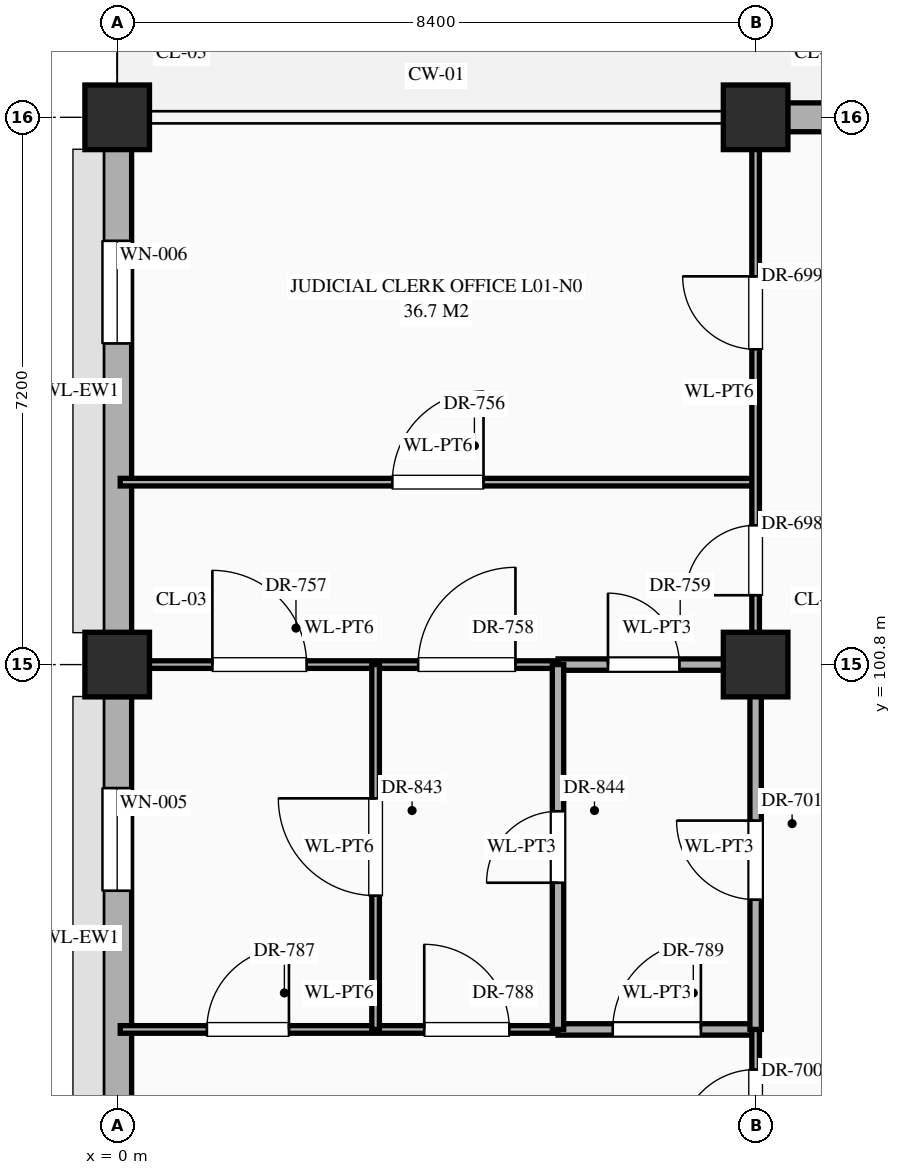
"""IFC4 building model, lengths in metres.
Left out: names, types, materials, properties, quantities, classifications, styles, units other than length and angle.
Written with IfcOpenShell. Run it as: python <this file> out.ifc"""

import sys

from ifc_helpers import new_model, si_unit, direction, frame, frame_2d, origin, origin_2d, place, context, subcontext, project, spatial, rectangle, extrude, element, fill, save


model = new_model("IFC4")
c1 = context("Model", 3, precision=1e-05, world=origin(), true_north=direction((0.0, 1.0)))
c2 = subcontext(c1, "Body", "Model", "MODEL_VIEW")
j1 = project(units=[si_unit("LENGTHUNIT", "METRE"), si_unit("PLANEANGLEUNIT", "RADIAN")], contexts=[c1])
p1 = place(None, origin())
s1 = spatial("IfcSite", under=j1, at=p1, CompositionType="ELEMENT")
p2 = place(p1, origin())
s2 = spatial("IfcBuilding", under=s1, at=p2, CompositionType="ELEMENT")
p3 = place(p2, origin())
s3 = spatial("IfcBuildingStorey", under=s2, at=p3, CompositionType="ELEMENT", Elevation=0.0)
for number, where, z_axis, x_axis in (
    (1, (0.0, 100.8, 0.0), (0.0, 0.0, 1.0), (1.0, 0.0, 0.0)),
    (2, (0.0, 108.0, 0.0), (0.0, 0.0, 1.0), (1.0, 0.0, 0.0)),
    (3, (8.4, 100.8, 0.0), (0.0, 0.0, 1.0), (1.0, 0.0, 0.0)),
    (4, (8.4, 108.0, 0.0), (0.0, 0.0, 1.0), (1.0, 0.0, 0.0)),
):
    element("IfcColumn", number, at=place(p3, frame(where, z_axis=z_axis, x_axis=x_axis)), inside=s3, PredefinedType="COLUMN", context=c2, shape_type="SweptSolid", body=[
        extrude(rectangle(XDim=0.85, YDim=0.85, at=origin_2d()), origin(), (0.0, 0.0, 1.0), 5.4),
    ])
p4 = place(p3, frame((0.0, 94.02, 0.0), z_axis=(0.0, 0.0, 1.0), x_axis=(0.0, 1.0, 0.0)))
e5 = element("IfcWall", 5, at=p4, inside=s3, PredefinedType="STANDARD", context=c2, shape_type="SweptSolid", body=[
    extrude(rectangle(XDim=6.36, YDim=0.38, at=frame_2d((3.18, 0.0))), origin(), (0.0, 0.0, 1.0), 4.47),
])
p5 = place(p4, frame((3.805, 0.0, 0.85)))
e6 = element("IfcOpeningElement", 6, at=p5, cuts=e5, PredefinedType="OPENING", context=c2, shape_type="SweptSolid", body=[
    extrude(rectangle(XDim=1.35, YDim=1.92, at=frame_2d((0.675, 0.96))), frame((0.0, 0.202, 0.0), z_axis=(0.0, -1.0, 0.0), x_axis=(1.0, 0.0, 0.0)), (0.0, 0.0, 1.0), 0.404),
])
p6 = place(p3, frame((0.0, 101.22, 0.0), z_axis=(0.0, 0.0, 1.0), x_axis=(0.0, 1.0, 0.0)))
e7 = element("IfcWall", 7, at=p6, inside=s3, PredefinedType="STANDARD", context=c2, shape_type="SweptSolid", body=[
    extrude(rectangle(XDim=6.36, YDim=0.38, at=frame_2d((3.18, 0.0))), origin(), (0.0, 0.0, 1.0), 4.47),
])
p7 = place(p6, frame((3.805, 0.0, 0.85)))
e8 = element("IfcOpeningElement", 8, at=p7, cuts=e7, PredefinedType="OPENING", context=c2, shape_type="SweptSolid", body=[
    extrude(rectangle(XDim=1.35, YDim=2.12, at=frame_2d((0.675, 1.06))), frame((0.0, 0.202, 0.0), z_axis=(0.0, -1.0, 0.0), x_axis=(1.0, 0.0, 0.0)), (0.0, 0.0, 1.0), 0.404),
])
p8 = place(p3, frame((8.82, 108.0, 0.0), z_axis=(0.0, 0.0, 1.0), x_axis=(1.0, 0.0, 0.0)))
e9 = element("IfcWall", 9, at=p8, inside=s3, PredefinedType="STANDARD", context=c2, shape_type="SweptSolid", body=[
    extrude(rectangle(XDim=7.56, YDim=0.38, at=frame_2d((3.78, 0.0))), origin(), (0.0, 0.0, 1.0), 4.47),
])
p9 = place(p8, frame((1.68, 0.0, 0.0)))
e10 = element("IfcOpeningElement", 10, at=p9, cuts=e9, PredefinedType="OPENING", context=c2, shape_type="SweptSolid", body=[
    extrude(rectangle(XDim=4.2, YDim=3.6, at=frame_2d((2.1, 1.8))), frame((0.0, 0.202, 0.0), z_axis=(0.0, -1.0, 0.0), x_axis=(1.0, 0.0, 0.0)), (0.0, 0.0, 1.0), 0.404),
])
p10 = place(p3, frame((0.04, 96.0, 0.0), z_axis=(0.0, 0.0, 1.0), x_axis=(1.0, 0.0, 0.0)))
e11 = element("IfcWall", 11, at=p10, inside=s3, PredefinedType="STANDARD", context=c2, shape_type="SweptSolid", body=[
    extrude(rectangle(XDim=5.76, YDim=0.1, at=frame_2d((2.88, 0.0))), origin(), (0.0, 0.0, 1.0), 5.12),
])
p11 = place(p10, frame((1.14, 0.0, 0.0)))
e12 = element("IfcOpeningElement", 12, at=p11, cuts=e11, PredefinedType="OPENING", context=c2, shape_type="SweptSolid", body=[
    extrude(rectangle(XDim=1.08, YDim=2.25, at=frame_2d((0.54, 1.125))), frame((0.0, 0.062, 0.0), z_axis=(0.0, -1.0, 0.0), x_axis=(1.0, 0.0, 0.0)), (0.0, 0.0, 1.0), 0.124),
])
p12 = place(p10, frame((4.0, 0.0, 0.0)))
e13 = element("IfcOpeningElement", 13, at=p12, cuts=e11, PredefinedType="OPENING", context=c2, shape_type="SweptSolid", body=[
    extrude(rectangle(XDim=1.12, YDim=2.25, at=frame_2d((0.56, 1.125))), frame((0.0, 0.062, 0.0), z_axis=(0.0, -1.0, 0.0), x_axis=(1.0, 0.0, 0.0)), (0.0, 0.0, 1.0), 0.124),
])
p13 = place(p3, frame((5.8, 96.0, 0.0), z_axis=(0.0, 0.0, 1.0), x_axis=(1.0, 0.0, 0.0)))
e14 = element("IfcWall", 14, at=p13, inside=s3, PredefinedType="STANDARD", context=c2, shape_type="SweptSolid", body=[
    extrude(rectangle(XDim=2.6, YDim=0.15, at=frame_2d((1.3, 0.0))), origin(), (0.0, 0.0, 1.0), 5.12),
])
p14 = place(p13, frame((0.72, 0.0, 0.0)))
e15 = element("IfcOpeningElement", 15, at=p14, cuts=e14, PredefinedType="OPENING", context=c2, shape_type="SweptSolid", body=[
    extrude(rectangle(XDim=1.16, YDim=2.3, at=frame_2d((0.58, 1.15))), frame((0.0, 0.087, 0.0), z_axis=(0.0, -1.0, 0.0), x_axis=(1.0, 0.0, 0.0)), (0.0, 0.0, 1.0), 0.174),
])
p15 = place(p3, frame((0.04, 100.8, 0.0), z_axis=(0.0, 0.0, 1.0), x_axis=(1.0, 0.0, 0.0)))
e16 = element("IfcWall", 16, at=p15, inside=s3, PredefinedType="STANDARD", context=c2, shape_type="SweptSolid", body=[
    extrude(rectangle(XDim=5.76, YDim=0.1, at=frame_2d((2.88, 0.0))), origin(), (0.0, 0.0, 1.0), 4.27),
])
p16 = place(p15, frame((1.212, 0.0, 0.0)))
e17 = element("IfcOpeningElement", 17, at=p16, cuts=e16, PredefinedType="OPENING", context=c2, shape_type="SweptSolid", body=[
    extrude(rectangle(XDim=1.24, YDim=2.3, at=frame_2d((0.62, 1.15))), frame((0.0, 0.062, 0.0), z_axis=(0.0, -1.0, 0.0), x_axis=(1.0, 0.0, 0.0)), (0.0, 0.0, 1.0), 0.124),
])
p17 = place(p15, frame((3.92, 0.0, 0.0)))
e18 = element("IfcOpeningElement", 18, at=p17, cuts=e16, PredefinedType="OPENING", context=c2, shape_type="SweptSolid", body=[
    extrude(rectangle(XDim=1.28, YDim=2.35, at=frame_2d((0.64, 1.175))), frame((0.0, 0.062, 0.0), z_axis=(0.0, -1.0, 0.0), x_axis=(1.0, 0.0, 0.0)), (0.0, 0.0, 1.0), 0.124),
])
p18 = place(p3, frame((5.8, 100.8, 0.0), z_axis=(0.0, 0.0, 1.0), x_axis=(1.0, 0.0, 0.0)))
e19 = element("IfcWall", 19, at=p18, inside=s3, PredefinedType="STANDARD", context=c2, shape_type="SweptSolid", body=[
    extrude(rectangle(XDim=2.6, YDim=0.15, at=frame_2d((1.3, 0.0))), origin(), (0.0, 0.0, 1.0), 4.27),
])
p19 = place(p18, frame((0.657, 0.0, 0.0)))
e20 = element("IfcOpeningElement", 20, at=p19, cuts=e19, PredefinedType="OPENING", context=c2, shape_type="SweptSolid", body=[
    extrude(rectangle(XDim=0.94, YDim=2.3, at=frame_2d((0.47, 1.15))), frame((0.0, 0.087, 0.0), z_axis=(0.0, -1.0, 0.0), x_axis=(1.0, 0.0, 0.0)), (0.0, 0.0, 1.0), 0.174),
])
p20 = place(p3, frame((0.04, 103.2, 0.0), z_axis=(0.0, 0.0, 1.0), x_axis=(1.0, 0.0, 0.0)))
e21 = element("IfcWall", 21, at=p20, inside=s3, PredefinedType="STANDARD", context=c2, shape_type="SweptSolid", body=[
    extrude(rectangle(XDim=8.36, YDim=0.1, at=frame_2d((4.18, 0.0))), origin(), (0.0, 0.0, 1.0), 5.12),
])
p21 = place(p20, frame((3.58, 0.0, 0.0)))
e22 = element("IfcOpeningElement", 22, at=p21, cuts=e21, PredefinedType="OPENING", context=c2, shape_type="SweptSolid", body=[
    extrude(rectangle(XDim=1.2, YDim=2.35, at=frame_2d((0.6, 1.175))), frame((0.0, 0.062, 0.0), z_axis=(0.0, -1.0, 0.0), x_axis=(1.0, 0.0, 0.0)), (0.0, 0.0, 1.0), 0.124),
])
p22 = place(p3, frame((3.4, 96.0, 0.0), z_axis=(0.0, 0.0, 1.0), x_axis=(0.0, 1.0, 0.0)))
e23 = element("IfcWall", 23, at=p22, inside=s3, PredefinedType="STANDARD", context=c2, shape_type="SweptSolid", body=[
    extrude(rectangle(XDim=4.8, YDim=0.1, at=frame_2d((2.4, 0.0))), origin(), (0.0, 0.0, 1.0), 5.12),
])
p23 = place(p22, frame((1.76, 0.0, 0.0)))
e24 = element("IfcOpeningElement", 24, at=p23, cuts=e23, PredefinedType="OPENING", context=c2, shape_type="SweptSolid", body=[
    extrude(rectangle(XDim=1.28, YDim=2.35, at=frame_2d((0.64, 1.175))), frame((0.0, 0.062, 0.0), z_axis=(0.0, -1.0, 0.0), x_axis=(1.0, 0.0, 0.0)), (0.0, 0.0, 1.0), 0.124),
])
p24 = place(p3, frame((5.8, 96.0, 0.0), z_axis=(0.0, 0.0, 1.0), x_axis=(0.0, 1.0, 0.0)))
e25 = element("IfcWall", 25, at=p24, inside=s3, PredefinedType="STANDARD", context=c2, shape_type="SweptSolid", body=[
    extrude(rectangle(XDim=4.8, YDim=0.15, at=frame_2d((2.4, 0.0))), origin(), (0.0, 0.0, 1.0), 5.12),
])
p25 = place(p24, frame((1.93, 0.0, 0.0)))
e26 = element("IfcOpeningElement", 26, at=p25, cuts=e25, PredefinedType="OPENING", context=c2, shape_type="SweptSolid", body=[
    extrude(rectangle(XDim=0.94, YDim=2.3, at=frame_2d((0.47, 1.15))), frame((0.0, 0.087, 0.0), z_axis=(0.0, -1.0, 0.0), x_axis=(1.0, 0.0, 0.0)), (0.0, 0.0, 1.0), 0.174),
])
p26 = place(p3, frame((8.4, 43.2, 0.0), z_axis=(0.0, 0.0, 1.0), x_axis=(0.0, 1.0, 0.0)))
e27 = element("IfcWall", 27, at=p26, inside=s3, PredefinedType="STANDARD", context=c2, shape_type="SweptSolid", body=[
    extrude(rectangle(XDim=52.8, YDim=0.1, at=frame_2d((26.4, 0.0))), origin(), (0.0, 0.0, 1.0), 4.37),
])
p27 = place(p26, frame((51.272, 0.0, 0.0)))
e28 = element("IfcOpeningElement", 28, at=p27, cuts=e27, PredefinedType="OPENING", context=c2, shape_type="SweptSolid", body=[
    extrude(rectangle(XDim=1.0, YDim=2.25, at=frame_2d((0.5, 1.125))), frame((0.0, 0.062, 0.0), z_axis=(0.0, -1.0, 0.0), x_axis=(1.0, 0.0, 0.0)), (0.0, 0.0, 1.0), 0.124),
])
p28 = place(p26, frame((46.26, 0.0, 0.0)))
e29 = element("IfcOpeningElement", 29, at=p28, cuts=e27, PredefinedType="OPENING", context=c2, shape_type="SweptSolid", body=[
    extrude(rectangle(XDim=1.08, YDim=2.25, at=frame_2d((0.54, 1.125))), frame((0.0, 0.062, 0.0), z_axis=(0.0, -1.0, 0.0), x_axis=(1.0, 0.0, 0.0)), (0.0, 0.0, 1.0), 0.124),
])
p29 = place(p26, frame((41.268, 0.0, 0.0)))
e30 = element("IfcOpeningElement", 30, at=p29, cuts=e27, PredefinedType="OPENING", context=c2, shape_type="SweptSolid", body=[
    extrude(rectangle(XDim=1.12, YDim=2.25, at=frame_2d((0.56, 1.125))), frame((0.0, 0.062, 0.0), z_axis=(0.0, -1.0, 0.0), x_axis=(1.0, 0.0, 0.0)), (0.0, 0.0, 1.0), 0.124),
])
p30 = place(p26, frame((37.992, 0.0, 0.0)))
e31 = element("IfcOpeningElement", 31, at=p30, cuts=e27, PredefinedType="OPENING", context=c2, shape_type="SweptSolid", body=[
    extrude(rectangle(XDim=1.16, YDim=2.3, at=frame_2d((0.58, 1.15))), frame((0.0, 0.062, 0.0), z_axis=(0.0, -1.0, 0.0), x_axis=(1.0, 0.0, 0.0)), (0.0, 0.0, 1.0), 0.124),
])
p31 = place(p26, frame((17.38, 0.0, 0.0)))
e32 = element("IfcOpeningElement", 32, at=p31, cuts=e27, PredefinedType="OPENING", context=c2, shape_type="SweptSolid", body=[
    extrude(rectangle(XDim=1.24, YDim=2.3, at=frame_2d((0.62, 1.15))), frame((0.0, 0.062, 0.0), z_axis=(0.0, -1.0, 0.0), x_axis=(1.0, 0.0, 0.0)), (0.0, 0.0, 1.0), 0.124),
])
p32 = place(p26, frame((24.56, 0.0, 0.0)))
e33 = element("IfcOpeningElement", 33, at=p32, cuts=e27, PredefinedType="OPENING", context=c2, shape_type="SweptSolid", body=[
    extrude(rectangle(XDim=1.28, YDim=2.35, at=frame_2d((0.64, 1.175))), frame((0.0, 0.062, 0.0), z_axis=(0.0, -1.0, 0.0), x_axis=(1.0, 0.0, 0.0)), (0.0, 0.0, 1.0), 0.124),
])
p33 = place(p26, frame((31.93, 0.0, 0.0)))
e34 = element("IfcOpeningElement", 34, at=p33, cuts=e27, PredefinedType="OPENING", context=c2, shape_type="SweptSolid", body=[
    extrude(rectangle(XDim=0.94, YDim=2.3, at=frame_2d((0.47, 1.15))), frame((0.0, 0.062, 0.0), z_axis=(0.0, -1.0, 0.0), x_axis=(1.0, 0.0, 0.0)), (0.0, 0.0, 1.0), 0.124),
])
p34 = place(p26, frame((0.772, 0.0, 0.0)))
e35 = element("IfcOpeningElement", 35, at=p34, cuts=e27, PredefinedType="OPENING", context=c2, shape_type="SweptSolid", body=[
    extrude(rectangle(XDim=1.2, YDim=2.35, at=frame_2d((0.6, 1.175))), frame((0.0, 0.062, 0.0), z_axis=(0.0, -1.0, 0.0), x_axis=(1.0, 0.0, 0.0)), (0.0, 0.0, 1.0), 0.124),
])
p35 = place(p26, frame((4.008, 0.0, 0.0)))
e36 = element("IfcOpeningElement", 36, at=p35, cuts=e27, PredefinedType="OPENING", context=c2, shape_type="SweptSolid", body=[
    extrude(rectangle(XDim=1.24, YDim=2.3, at=frame_2d((0.62, 1.15))), frame((0.0, 0.062, 0.0), z_axis=(0.0, -1.0, 0.0), x_axis=(1.0, 0.0, 0.0)), (0.0, 0.0, 1.0), 0.124),
])
p36 = place(p26, frame((10.16, 0.0, 0.0)))
e37 = element("IfcOpeningElement", 37, at=p36, cuts=e27, PredefinedType="OPENING", context=c2, shape_type="SweptSolid", body=[
    extrude(rectangle(XDim=1.28, YDim=2.35, at=frame_2d((0.64, 1.175))), frame((0.0, 0.062, 0.0), z_axis=(0.0, -1.0, 0.0), x_axis=(1.0, 0.0, 0.0)), (0.0, 0.0, 1.0), 0.124),
])
p37 = place(p3, frame((8.4, 96.0, 0.0), z_axis=(0.0, 0.0, 1.0), x_axis=(0.0, 1.0, 0.0)))
e38 = element("IfcWall", 38, at=p37, inside=s3, PredefinedType="STANDARD", context=c2, shape_type="SweptSolid", body=[
    extrude(rectangle(XDim=4.8, YDim=0.15, at=frame_2d((2.4, 0.0))), origin(), (0.0, 0.0, 1.0), 4.37),
])
p38 = place(p37, frame((1.708, 0.0, 0.0)))
e39 = element("IfcOpeningElement", 39, at=p38, cuts=e38, PredefinedType="OPENING", context=c2, shape_type="SweptSolid", body=[
    extrude(rectangle(XDim=1.04, YDim=2.2, at=frame_2d((0.52, 1.1))), frame((0.0, 0.087, 0.0), z_axis=(0.0, -1.0, 0.0), x_axis=(1.0, 0.0, 0.0)), (0.0, 0.0, 1.0), 0.174),
])
p39 = place(p3, frame((8.4, 100.8, 0.0), z_axis=(0.0, 0.0, 1.0), x_axis=(0.0, 1.0, 0.0)))
e40 = element("IfcWall", 40, at=p39, inside=s3, PredefinedType="STANDARD", context=c2, shape_type="SweptSolid", body=[
    extrude(rectangle(XDim=7.16, YDim=0.1, at=frame_2d((3.58, 0.0))), origin(), (0.0, 0.0, 1.0), 4.37),
])
p40 = place(p39, frame((0.913, 0.0, 0.0)))
e41 = element("IfcOpeningElement", 41, at=p40, cuts=e40, PredefinedType="OPENING", context=c2, shape_type="SweptSolid", body=[
    extrude(rectangle(XDim=0.92, YDim=2.15, at=frame_2d((0.46, 1.075))), frame((0.0, 0.062, 0.0), z_axis=(0.0, -1.0, 0.0), x_axis=(1.0, 0.0, 0.0)), (0.0, 0.0, 1.0), 0.124),
])
p41 = place(p39, frame((4.147, 0.0, 0.0)))
e42 = element("IfcOpeningElement", 42, at=p41, cuts=e40, PredefinedType="OPENING", context=c2, shape_type="SweptSolid", body=[
    extrude(rectangle(XDim=0.96, YDim=2.2, at=frame_2d((0.48, 1.1))), frame((0.0, 0.062, 0.0), z_axis=(0.0, -1.0, 0.0), x_axis=(1.0, 0.0, 0.0)), (0.0, 0.0, 1.0), 0.124),
])
p42 = place(p5, origin())
e43 = element("IfcWindow", 43, at=p42, inside=s3, PartitioningType="SINGLE_PANEL", PredefinedType="WINDOW", context=c2, shape_type="SweptSolid", body=[
    extrude(rectangle(XDim=1.35, YDim=1.92, at=frame_2d((0.675, 0.96))), frame((0.0, 0.03, 0.0), z_axis=(0.0, -1.0, 0.0), x_axis=(1.0, 0.0, 0.0)), (0.0, 0.0, 1.0), 0.06),
])
fill(e6, e43)
p43 = place(p7, origin())
e44 = element("IfcWindow", 44, at=p43, inside=s3, PartitioningType="SINGLE_PANEL", PredefinedType="WINDOW", context=c2, shape_type="SweptSolid", body=[
    extrude(rectangle(XDim=1.35, YDim=2.12, at=frame_2d((0.675, 1.06))), frame((0.0, 0.03, 0.0), z_axis=(0.0, -1.0, 0.0), x_axis=(1.0, 0.0, 0.0)), (0.0, 0.0, 1.0), 0.06),
])
fill(e8, e44)
p44 = place(p40, origin())
e45 = element("IfcDoor", 45, at=p44, inside=s3, OperationType="SINGLE_SWING_LEFT", PredefinedType="DOOR", context=c2, shape_type="SweptSolid", body=[
    extrude(rectangle(XDim=0.92, YDim=2.15, at=frame_2d((0.46, 1.075))), frame((0.0, 0.025, 0.0), z_axis=(0.0, -1.0, 0.0), x_axis=(1.0, 0.0, 0.0)), (0.0, 0.0, 1.0), 0.05),
])
fill(e41, e45)
p45 = place(p41, origin())
e46 = element("IfcDoor", 46, at=p45, inside=s3, OperationType="SINGLE_SWING_RIGHT", PredefinedType="DOOR", context=c2, shape_type="SweptSolid", body=[
    extrude(rectangle(XDim=0.96, YDim=2.2, at=frame_2d((0.48, 1.1))), frame((0.0, 0.025, 0.0), z_axis=(0.0, -1.0, 0.0), x_axis=(1.0, 0.0, 0.0)), (0.0, 0.0, 1.0), 0.05),
])
fill(e42, e46)
p46 = place(p27, origin())
e47 = element("IfcDoor", 47, at=p46, inside=s3, OperationType="SINGLE_SWING_LEFT", PredefinedType="DOOR", context=c2, shape_type="SweptSolid", body=[
    extrude(rectangle(XDim=1.0, YDim=2.25, at=frame_2d((0.5, 1.125))), frame((0.0, 0.025, 0.0), z_axis=(0.0, -1.0, 0.0), x_axis=(1.0, 0.0, 0.0)), (0.0, 0.0, 1.0), 0.05),
])
fill(e28, e47)
p47 = place(p38, origin())
e48 = element("IfcDoor", 48, at=p47, inside=s3, OperationType="SINGLE_SWING_RIGHT", PredefinedType="DOOR", context=c2, shape_type="SweptSolid", body=[
    extrude(rectangle(XDim=1.04, YDim=2.2, at=frame_2d((0.52, 1.1))), frame((0.0, 0.025, 0.0), z_axis=(0.0, -1.0, 0.0), x_axis=(1.0, 0.0, 0.0)), (0.0, 0.0, 1.0), 0.05),
])
fill(e39, e48)
p48 = place(p21, origin())
e49 = element("IfcDoor", 49, at=p48, inside=s3, OperationType="SINGLE_SWING_RIGHT", PredefinedType="DOOR", context=c2, shape_type="SweptSolid", body=[
    extrude(rectangle(XDim=1.2, YDim=2.35, at=frame_2d((0.6, 1.175))), frame((0.0, 0.025, 0.0), z_axis=(0.0, -1.0, 0.0), x_axis=(1.0, 0.0, 0.0)), (0.0, 0.0, 1.0), 0.05),
])
fill(e22, e49)
p49 = place(p16, origin())
e50 = element("IfcDoor", 50, at=p49, inside=s3, OperationType="SINGLE_SWING_LEFT", PredefinedType="DOOR", context=c2, shape_type="SweptSolid", body=[
    extrude(rectangle(XDim=1.24, YDim=2.3, at=frame_2d((0.62, 1.15))), frame((0.0, 0.025, 0.0), z_axis=(0.0, -1.0, 0.0), x_axis=(1.0, 0.0, 0.0)), (0.0, 0.0, 1.0), 0.05),
])
fill(e17, e50)
p50 = place(p17, origin())
e51 = element("IfcDoor", 51, at=p50, inside=s3, OperationType="SINGLE_SWING_RIGHT", PredefinedType="DOOR", context=c2, shape_type="SweptSolid", body=[
    extrude(rectangle(XDim=1.28, YDim=2.35, at=frame_2d((0.64, 1.175))), frame((0.0, 0.025, 0.0), z_axis=(0.0, -1.0, 0.0), x_axis=(1.0, 0.0, 0.0)), (0.0, 0.0, 1.0), 0.05),
])
fill(e18, e51)
p51 = place(p19, origin())
e52 = element("IfcDoor", 52, at=p51, inside=s3, OperationType="SINGLE_SWING_LEFT", PredefinedType="DOOR", context=c2, shape_type="SweptSolid", body=[
    extrude(rectangle(XDim=0.94, YDim=2.3, at=frame_2d((0.47, 1.15))), frame((0.0, 0.025, 0.0), z_axis=(0.0, -1.0, 0.0), x_axis=(1.0, 0.0, 0.0)), (0.0, 0.0, 1.0), 0.05),
])
fill(e20, e52)
p52 = place(p11, origin())
e53 = element("IfcDoor", 53, at=p52, inside=s3, OperationType="SINGLE_SWING_RIGHT", PredefinedType="DOOR", context=c2, shape_type="SweptSolid", body=[
    extrude(rectangle(XDim=1.08, YDim=2.25, at=frame_2d((0.54, 1.125))), frame((0.0, 0.025, 0.0), z_axis=(0.0, -1.0, 0.0), x_axis=(1.0, 0.0, 0.0)), (0.0, 0.0, 1.0), 0.05),
])
fill(e12, e53)
p53 = place(p12, origin())
e54 = element("IfcDoor", 54, at=p53, inside=s3, OperationType="SINGLE_SWING_LEFT", PredefinedType="DOOR", context=c2, shape_type="SweptSolid", body=[
    extrude(rectangle(XDim=1.12, YDim=2.25, at=frame_2d((0.56, 1.125))), frame((0.0, 0.025, 0.0), z_axis=(0.0, -1.0, 0.0), x_axis=(1.0, 0.0, 0.0)), (0.0, 0.0, 1.0), 0.05),
])
fill(e13, e54)
p54 = place(p14, origin())
e55 = element("IfcDoor", 55, at=p54, inside=s3, OperationType="SINGLE_SWING_RIGHT", PredefinedType="DOOR", context=c2, shape_type="SweptSolid", body=[
    extrude(rectangle(XDim=1.16, YDim=2.3, at=frame_2d((0.58, 1.15))), frame((0.0, 0.025, 0.0), z_axis=(0.0, -1.0, 0.0), x_axis=(1.0, 0.0, 0.0)), (0.0, 0.0, 1.0), 0.05),
])
fill(e15, e55)
p55 = place(p23, origin())
e56 = element("IfcDoor", 56, at=p55, inside=s3, OperationType="SINGLE_SWING_RIGHT", PredefinedType="DOOR", context=c2, shape_type="SweptSolid", body=[
    extrude(rectangle(XDim=1.28, YDim=2.35, at=frame_2d((0.64, 1.175))), frame((0.0, 0.025, 0.0), z_axis=(0.0, -1.0, 0.0), x_axis=(1.0, 0.0, 0.0)), (0.0, 0.0, 1.0), 0.05),
])
fill(e24, e56)
p56 = place(p25, origin())
e57 = element("IfcDoor", 57, at=p56, inside=s3, OperationType="SINGLE_SWING_LEFT", PredefinedType="DOOR", context=c2, shape_type="SweptSolid", body=[
    extrude(rectangle(XDim=0.94, YDim=2.3, at=frame_2d((0.47, 1.15))), frame((0.0, 0.025, 0.0), z_axis=(0.0, -1.0, 0.0), x_axis=(1.0, 0.0, 0.0)), (0.0, 0.0, 1.0), 0.05),
])
fill(e26, e57)
save(model, sys.argv[1])
